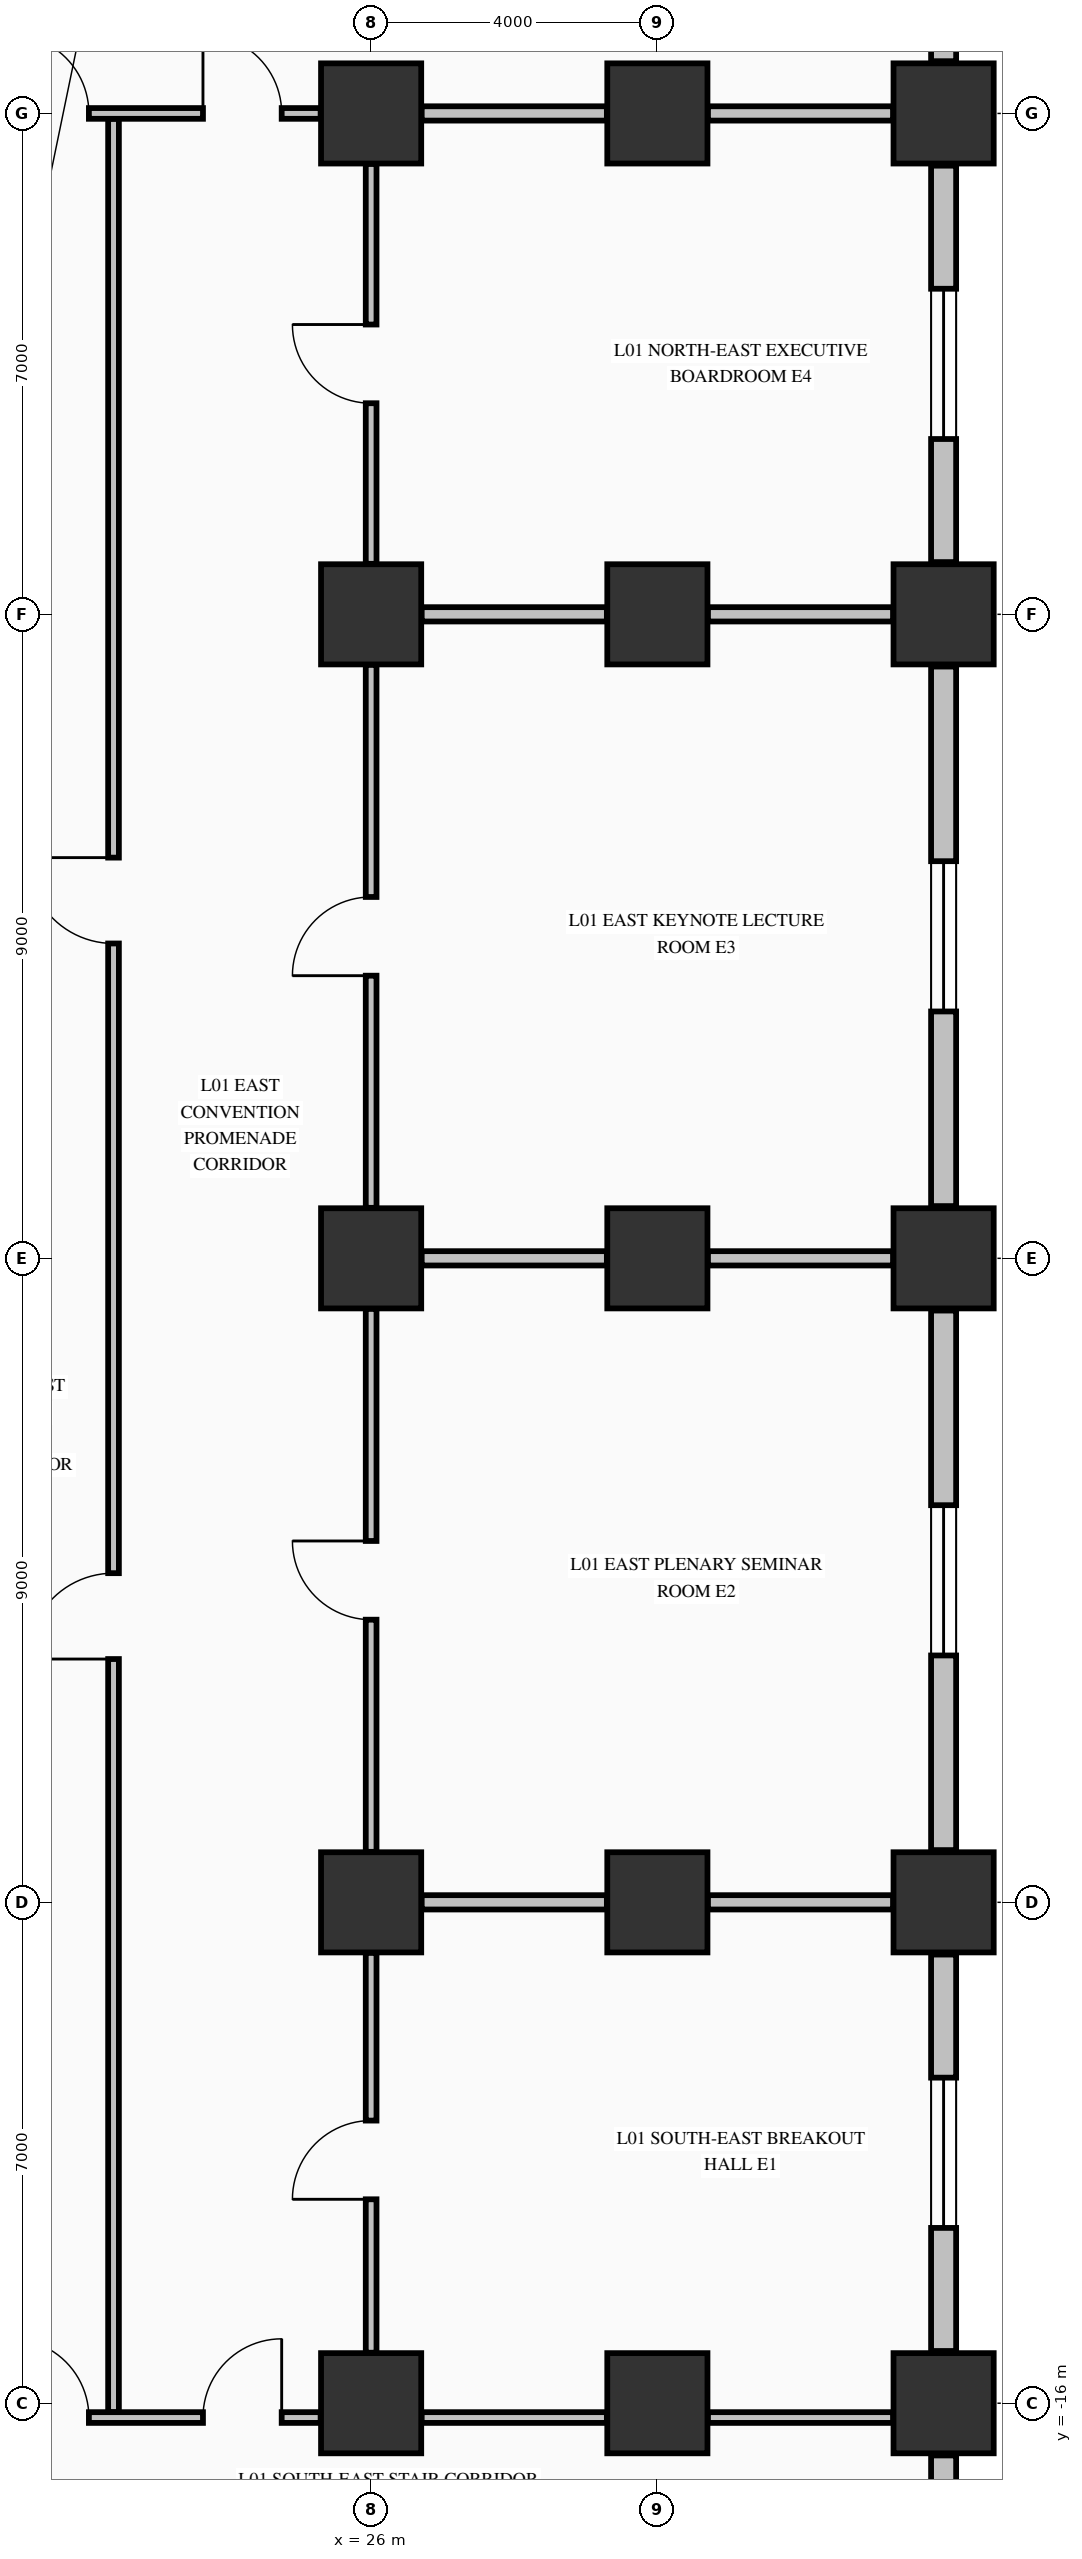
"""IFC4 building model, lengths in metres.
Left out: names, types, materials, properties, quantities, classifications, styles, units other than length and angle.
Written with IfcOpenShell. Run it as: python <this file> out.ifc"""

import sys

from ifc_helpers import new_model, si_unit, direction, frame, frame_2d, origin, origin_2d, place, context, subcontext, project, spatial, rectangle, extrude, element, fill, save


model = new_model("IFC4")
c1 = context("Model", 3, precision=1e-05, world=origin(), true_north=direction((0.0, 1.0)))
c2 = subcontext(c1, "Body", "Model", "MODEL_VIEW")
j1 = project(units=[si_unit("LENGTHUNIT", "METRE"), si_unit("PLANEANGLEUNIT", "RADIAN")], contexts=[c1])
p1 = place(None, origin())
s1 = spatial("IfcSite", under=j1, at=p1, CompositionType="ELEMENT")
p2 = place(p1, origin())
s2 = spatial("IfcBuilding", under=s1, at=p2, CompositionType="ELEMENT")
p3 = place(p2, frame((0.0, 0.0, 5.44)))
s3 = spatial("IfcBuildingStorey", under=s2, at=p3, CompositionType="ELEMENT", Elevation=5.44)
for number, where, z_axis, x_axis in (
    (1, (26.0, -16.0, 0.0), (0.0, 0.0, 1.0), (1.0, 0.0, 0.0)),
    (2, (26.0, -9.0, 0.0), (0.0, 0.0, 1.0), (1.0, 0.0, 0.0)),
    (3, (26.0, 0.0, 0.0), (0.0, 0.0, 1.0), (1.0, 0.0, 0.0)),
    (4, (26.0, 9.0, 0.0), (0.0, 0.0, 1.0), (1.0, 0.0, 0.0)),
    (5, (26.0, 16.0, 0.0), (0.0, 0.0, 1.0), (1.0, 0.0, 0.0)),
    (6, (30.0, -16.0, 0.0), (0.0, 0.0, 1.0), (1.0, 0.0, 0.0)),
    (7, (30.0, -9.0, 0.0), (0.0, 0.0, 1.0), (1.0, 0.0, 0.0)),
    (8, (30.0, 0.0, 0.0), (0.0, 0.0, 1.0), (1.0, 0.0, 0.0)),
    (9, (30.0, 9.0, 0.0), (0.0, 0.0, 1.0), (1.0, 0.0, 0.0)),
    (10, (30.0, 16.0, 0.0), (0.0, 0.0, 1.0), (1.0, 0.0, 0.0)),
    (11, (34.0, -16.0, 0.0), (0.0, 0.0, 1.0), (1.0, 0.0, 0.0)),
    (12, (34.0, -9.0, 0.0), (0.0, 0.0, 1.0), (1.0, 0.0, 0.0)),
    (13, (34.0, 0.0, 0.0), (0.0, 0.0, 1.0), (1.0, 0.0, 0.0)),
    (14, (34.0, 9.0, 0.0), (0.0, 0.0, 1.0), (1.0, 0.0, 0.0)),
    (15, (34.0, 16.0, 0.0), (0.0, 0.0, 1.0), (1.0, 0.0, 0.0)),
):
    element("IfcColumn", number, at=place(p3, frame(where, z_axis=z_axis, x_axis=x_axis)), inside=s3, PredefinedType="COLUMN", context=c2, shape_type="SweptSolid", body=[
        extrude(rectangle(XDim=1.4, YDim=1.4, at=origin_2d()), origin(), (0.0, 0.0, 1.0), 5.09),
    ])
p4 = place(p3, frame((34.0, -16.73, 0.0), z_axis=(0.0, 0.0, 1.0), x_axis=(0.0, -1.0, 0.0)))
e16 = element("IfcWall", 16, at=p4, inside=s3, PredefinedType="STANDARD", context=c2, shape_type="SweptSolid", body=[
    extrude(rectangle(XDim=4.54, YDim=0.35, at=frame_2d((2.27, 0.0))), origin(), (0.0, 0.0, 1.0), 5.09),
])
p5 = place(p3, frame((34.0, -9.73, 0.0), z_axis=(0.0, 0.0, 1.0), x_axis=(0.0, -1.0, 0.0)))
e17 = element("IfcWall", 17, at=p5, inside=s3, PredefinedType="STANDARD", context=c2, shape_type="SweptSolid", body=[
    extrude(rectangle(XDim=5.54, YDim=0.35, at=frame_2d((2.77, 0.0))), origin(), (0.0, 0.0, 1.0), 4.482),
])
p6 = place(p5, frame((1.72, 0.0, 0.75)))
e18 = element("IfcOpeningElement", 18, at=p6, cuts=e17, PredefinedType="OPENING", context=c2, shape_type="SweptSolid", body=[
    extrude(rectangle(XDim=2.1, YDim=1.75, at=frame_2d((1.05, 0.875))), frame((0.0, 0.185, 0.0), z_axis=(0.0, -1.0, 0.0), x_axis=(1.0, 0.0, 0.0)), (0.0, 0.0, 1.0), 0.37),
])
p7 = place(p3, frame((34.0, -0.73, 0.0), z_axis=(0.0, 0.0, 1.0), x_axis=(0.0, -1.0, 0.0)))
e19 = element("IfcWall", 19, at=p7, inside=s3, PredefinedType="STANDARD", context=c2, shape_type="SweptSolid", body=[
    extrude(rectangle(XDim=7.54, YDim=0.35, at=frame_2d((3.77, 0.0))), origin(), (0.0, 0.0, 1.0), 4.482),
])
p8 = place(p7, frame((2.72, 0.0, 0.75)))
e20 = element("IfcOpeningElement", 20, at=p8, cuts=e19, PredefinedType="OPENING", context=c2, shape_type="SweptSolid", body=[
    extrude(rectangle(XDim=2.1, YDim=1.75, at=frame_2d((1.05, 0.875))), frame((0.0, 0.185, 0.0), z_axis=(0.0, -1.0, 0.0), x_axis=(1.0, 0.0, 0.0)), (0.0, 0.0, 1.0), 0.37),
])
p9 = place(p3, frame((34.0, 8.27, 0.0), z_axis=(0.0, 0.0, 1.0), x_axis=(0.0, -1.0, 0.0)))
e21 = element("IfcWall", 21, at=p9, inside=s3, PredefinedType="STANDARD", context=c2, shape_type="SweptSolid", body=[
    extrude(rectangle(XDim=7.54, YDim=0.35, at=frame_2d((3.77, 0.0))), origin(), (0.0, 0.0, 1.0), 4.482),
])
p10 = place(p9, frame((2.72, 0.0, 0.75)))
e22 = element("IfcOpeningElement", 22, at=p10, cuts=e21, PredefinedType="OPENING", context=c2, shape_type="SweptSolid", body=[
    extrude(rectangle(XDim=2.1, YDim=1.75, at=frame_2d((1.05, 0.875))), frame((0.0, 0.185, 0.0), z_axis=(0.0, -1.0, 0.0), x_axis=(1.0, 0.0, 0.0)), (0.0, 0.0, 1.0), 0.37),
])
p11 = place(p3, frame((34.0, 15.27, 0.0), z_axis=(0.0, 0.0, 1.0), x_axis=(0.0, -1.0, 0.0)))
e23 = element("IfcWall", 23, at=p11, inside=s3, PredefinedType="STANDARD", context=c2, shape_type="SweptSolid", body=[
    extrude(rectangle(XDim=5.54, YDim=0.35, at=frame_2d((2.77, 0.0))), origin(), (0.0, 0.0, 1.0), 4.482),
])
p12 = place(p11, frame((1.72, 0.0, 0.75)))
e24 = element("IfcOpeningElement", 24, at=p12, cuts=e23, PredefinedType="OPENING", context=c2, shape_type="SweptSolid", body=[
    extrude(rectangle(XDim=2.1, YDim=1.75, at=frame_2d((1.05, 0.875))), frame((0.0, 0.185, 0.0), z_axis=(0.0, -1.0, 0.0), x_axis=(1.0, 0.0, 0.0)), (0.0, 0.0, 1.0), 0.37),
])
p13 = place(p3, frame((34.0, 21.27, 0.0), z_axis=(0.0, 0.0, 1.0), x_axis=(0.0, -1.0, 0.0)))
e25 = element("IfcWall", 25, at=p13, inside=s3, PredefinedType="STANDARD", context=c2, shape_type="SweptSolid", body=[
    extrude(rectangle(XDim=4.54, YDim=0.35, at=frame_2d((2.27, 0.0))), origin(), (0.0, 0.0, 1.0), 5.09),
])
p14 = place(p3, frame((20.806, -16.2, 0.0), z_axis=(0.0, 0.0, 1.0), x_axis=(1.0, 0.0, 0.0)))
e26 = element("IfcWall", 26, at=p14, inside=s3, PredefinedType="PARTITIONING", context=c2, shape_type="SweptSolid", body=[
    extrude(rectangle(XDim=4.488, YDim=0.15, at=frame_2d((2.244, 0.0))), origin(), (0.0, 0.0, 1.0), 4.132),
])
p15 = place(p14, frame((0.15, 0.0, 0.0)))
e27 = element("IfcOpeningElement", 27, at=p15, cuts=e26, PredefinedType="OPENING", context=c2, shape_type="SweptSolid", body=[
    extrude(rectangle(XDim=1.1, YDim=2.15, at=frame_2d((0.55, 1.075))), frame((0.0, 0.085, 0.0), z_axis=(0.0, -1.0, 0.0), x_axis=(1.0, 0.0, 0.0)), (0.0, 0.0, 1.0), 0.17),
])
p16 = place(p14, frame((2.844, 0.0, 0.0)))
e28 = element("IfcOpeningElement", 28, at=p16, cuts=e26, PredefinedType="OPENING", context=c2, shape_type="SweptSolid", body=[
    extrude(rectangle(XDim=1.1, YDim=2.15, at=frame_2d((0.55, 1.075))), frame((0.0, 0.085, 0.0), z_axis=(0.0, -1.0, 0.0), x_axis=(1.0, 0.0, 0.0)), (0.0, 0.0, 1.0), 0.17),
])
for number, where, z_axis, x_axis in (
    (29, (26.706, -16.2, 0.0), (0.0, 0.0, 1.0), (1.0, 0.0, 0.0)),
    (30, (30.706, -16.2, 0.0), (0.0, 0.0, 1.0), (1.0, 0.0, 0.0)),
):
    element("IfcWall", number, at=place(p3, frame(where, z_axis=z_axis, x_axis=x_axis)), inside=s3, PredefinedType="PARTITIONING", context=c2, shape_type="SweptSolid", body=[
        extrude(rectangle(XDim=2.588, YDim=0.15, at=frame_2d((1.294, 0.0))), origin(), (0.0, 0.0, 1.0), 4.132),
    ])
for number, where, z_axis, x_axis in (
    (31, (26.706, -9.0, 0.0), (0.0, 0.0, 1.0), (1.0, 0.0, 0.0)),
    (32, (30.706, -9.0, 0.0), (0.0, 0.0, 1.0), (1.0, 0.0, 0.0)),
    (33, (26.706, 0.0, 0.0), (0.0, 0.0, 1.0), (1.0, 0.0, 0.0)),
    (34, (30.706, 0.0, 0.0), (0.0, 0.0, 1.0), (1.0, 0.0, 0.0)),
    (35, (26.706, 9.0, 0.0), (0.0, 0.0, 1.0), (1.0, 0.0, 0.0)),
    (36, (30.706, 9.0, 0.0), (0.0, 0.0, 1.0), (1.0, 0.0, 0.0)),
):
    element("IfcWall", number, at=place(p3, frame(where, z_axis=z_axis, x_axis=x_axis)), inside=s3, PredefinedType="PARTITIONING", context=c2, shape_type="SweptSolid", body=[
        extrude(rectangle(XDim=2.588, YDim=0.2, at=frame_2d((1.294, 0.0))), origin(), (0.0, 0.0, 1.0), 4.132),
    ])
p17 = place(p3, frame((20.806, 16.0, 0.0), z_axis=(0.0, 0.0, 1.0), x_axis=(1.0, 0.0, 0.0)))
e37 = element("IfcWall", 37, at=p17, inside=s3, PredefinedType="PARTITIONING", context=c2, shape_type="SweptSolid", body=[
    extrude(rectangle(XDim=4.488, YDim=0.15, at=frame_2d((2.244, 0.0))), origin(), (0.0, 0.0, 1.0), 4.132),
])
p18 = place(p17, frame((0.15, 0.0, 0.0)))
e38 = element("IfcOpeningElement", 38, at=p18, cuts=e37, PredefinedType="OPENING", context=c2, shape_type="SweptSolid", body=[
    extrude(rectangle(XDim=1.1, YDim=2.15, at=frame_2d((0.55, 1.075))), frame((0.0, 0.085, 0.0), z_axis=(0.0, -1.0, 0.0), x_axis=(1.0, 0.0, 0.0)), (0.0, 0.0, 1.0), 0.17),
])
p19 = place(p17, frame((2.844, 0.0, 0.0)))
e39 = element("IfcOpeningElement", 39, at=p19, cuts=e37, PredefinedType="OPENING", context=c2, shape_type="SweptSolid", body=[
    extrude(rectangle(XDim=1.1, YDim=2.15, at=frame_2d((0.55, 1.075))), frame((0.0, 0.085, 0.0), z_axis=(0.0, -1.0, 0.0), x_axis=(1.0, 0.0, 0.0)), (0.0, 0.0, 1.0), 0.17),
])
for number, where, z_axis, x_axis in (
    (40, (26.706, 16.0, 0.0), (0.0, 0.0, 1.0), (1.0, 0.0, 0.0)),
    (41, (30.706, 16.0, 0.0), (0.0, 0.0, 1.0), (1.0, 0.0, 0.0)),
):
    element("IfcWall", number, at=place(p3, frame(where, z_axis=z_axis, x_axis=x_axis)), inside=s3, PredefinedType="PARTITIONING", context=c2, shape_type="SweptSolid", body=[
        extrude(rectangle(XDim=2.588, YDim=0.2, at=frame_2d((1.294, 0.0))), origin(), (0.0, 0.0, 1.0), 4.132),
    ])
p20 = place(p3, frame((22.4, -16.122, 0.0), z_axis=(0.0, 0.0, 1.0), x_axis=(0.0, 1.0, 0.0)))
e42 = element("IfcWall", 42, at=p20, inside=s3, PredefinedType="PARTITIONING", context=c2, shape_type="SweptSolid", body=[
    extrude(rectangle(XDim=32.044, YDim=0.15, at=frame_2d((16.022, 0.0))), origin(), (0.0, 0.0, 1.0), 5.09),
])
p21 = place(p20, frame((10.522, 0.0, 0.0)))
e43 = element("IfcOpeningElement", 43, at=p21, cuts=e42, PredefinedType="OPENING", context=c2, shape_type="SweptSolid", body=[
    extrude(rectangle(XDim=1.2, YDim=2.15, at=frame_2d((0.6, 1.075))), frame((0.0, 0.085, 0.0), z_axis=(0.0, -1.0, 0.0), x_axis=(1.0, 0.0, 0.0)), (0.0, 0.0, 1.0), 0.17),
])
p22 = place(p20, frame((20.522, 0.0, 0.0)))
e44 = element("IfcOpeningElement", 44, at=p22, cuts=e42, PredefinedType="OPENING", context=c2, shape_type="SweptSolid", body=[
    extrude(rectangle(XDim=1.2, YDim=2.15, at=frame_2d((0.6, 1.075))), frame((0.0, 0.085, 0.0), z_axis=(0.0, -1.0, 0.0), x_axis=(1.0, 0.0, 0.0)), (0.0, 0.0, 1.0), 0.17),
])
p23 = place(p3, frame((26.0, -15.294, 0.0), z_axis=(0.0, 0.0, 1.0), x_axis=(0.0, 1.0, 0.0)))
e45 = element("IfcWall", 45, at=p23, inside=s3, PredefinedType="PARTITIONING", context=c2, shape_type="SweptSolid", body=[
    extrude(rectangle(XDim=5.588, YDim=0.15, at=frame_2d((2.794, 0.0))), origin(), (0.0, 0.0, 1.0), 4.132),
])
p24 = place(p23, frame((2.144, 0.0, 0.0)))
e46 = element("IfcOpeningElement", 46, at=p24, cuts=e45, PredefinedType="OPENING", context=c2, shape_type="SweptSolid", body=[
    extrude(rectangle(XDim=1.1, YDim=2.15, at=frame_2d((0.55, 1.075))), frame((0.0, 0.085, 0.0), z_axis=(0.0, -1.0, 0.0), x_axis=(1.0, 0.0, 0.0)), (0.0, 0.0, 1.0), 0.17),
])
p25 = place(p3, frame((26.0, -8.294, 0.0), z_axis=(0.0, 0.0, 1.0), x_axis=(0.0, 1.0, 0.0)))
e47 = element("IfcWall", 47, at=p25, inside=s3, PredefinedType="PARTITIONING", context=c2, shape_type="SweptSolid", body=[
    extrude(rectangle(XDim=7.588, YDim=0.15, at=frame_2d((3.794, 0.0))), origin(), (0.0, 0.0, 1.0), 4.132),
])
p26 = place(p25, frame((3.244, 0.0, 0.0)))
e48 = element("IfcOpeningElement", 48, at=p26, cuts=e47, PredefinedType="OPENING", context=c2, shape_type="SweptSolid", body=[
    extrude(rectangle(XDim=1.1, YDim=2.15, at=frame_2d((0.55, 1.075))), frame((0.0, 0.085, 0.0), z_axis=(0.0, -1.0, 0.0), x_axis=(1.0, 0.0, 0.0)), (0.0, 0.0, 1.0), 0.17),
])
p27 = place(p3, frame((26.0, 0.706, 0.0), z_axis=(0.0, 0.0, 1.0), x_axis=(0.0, 1.0, 0.0)))
e49 = element("IfcWall", 49, at=p27, inside=s3, PredefinedType="PARTITIONING", context=c2, shape_type="SweptSolid", body=[
    extrude(rectangle(XDim=7.588, YDim=0.15, at=frame_2d((3.794, 0.0))), origin(), (0.0, 0.0, 1.0), 4.132),
])
p28 = place(p27, frame((3.244, 0.0, 0.0)))
e50 = element("IfcOpeningElement", 50, at=p28, cuts=e49, PredefinedType="OPENING", context=c2, shape_type="SweptSolid", body=[
    extrude(rectangle(XDim=1.1, YDim=2.15, at=frame_2d((0.55, 1.075))), frame((0.0, 0.085, 0.0), z_axis=(0.0, -1.0, 0.0), x_axis=(1.0, 0.0, 0.0)), (0.0, 0.0, 1.0), 0.17),
])
p29 = place(p3, frame((26.0, 9.706, 0.0), z_axis=(0.0, 0.0, 1.0), x_axis=(0.0, 1.0, 0.0)))
e51 = element("IfcWall", 51, at=p29, inside=s3, PredefinedType="PARTITIONING", context=c2, shape_type="SweptSolid", body=[
    extrude(rectangle(XDim=5.588, YDim=0.15, at=frame_2d((2.794, 0.0))), origin(), (0.0, 0.0, 1.0), 4.132),
])
p30 = place(p29, frame((2.244, 0.0, 0.0)))
e52 = element("IfcOpeningElement", 52, at=p30, cuts=e51, PredefinedType="OPENING", context=c2, shape_type="SweptSolid", body=[
    extrude(rectangle(XDim=1.1, YDim=2.15, at=frame_2d((0.55, 1.075))), frame((0.0, 0.085, 0.0), z_axis=(0.0, -1.0, 0.0), x_axis=(1.0, 0.0, 0.0)), (0.0, 0.0, 1.0), 0.17),
])
p31 = place(p6, origin())
e53 = element("IfcWindow", 53, at=p31, inside=s3, PartitioningType="SINGLE_PANEL", PredefinedType="WINDOW", context=c2, shape_type="SweptSolid", body=[
    extrude(rectangle(XDim=2.1, YDim=1.75, at=frame_2d((1.05, 0.875))), frame((0.0, 0.03, 0.0), z_axis=(0.0, -1.0, 0.0), x_axis=(1.0, 0.0, 0.0)), (0.0, 0.0, 1.0), 0.06),
])
fill(e18, e53)
p32 = place(p8, origin())
e54 = element("IfcWindow", 54, at=p32, inside=s3, PartitioningType="SINGLE_PANEL", PredefinedType="WINDOW", context=c2, shape_type="SweptSolid", body=[
    extrude(rectangle(XDim=2.1, YDim=1.75, at=frame_2d((1.05, 0.875))), frame((0.0, 0.03, 0.0), z_axis=(0.0, -1.0, 0.0), x_axis=(1.0, 0.0, 0.0)), (0.0, 0.0, 1.0), 0.06),
])
fill(e20, e54)
p33 = place(p10, origin())
e55 = element("IfcWindow", 55, at=p33, inside=s3, PartitioningType="SINGLE_PANEL", PredefinedType="WINDOW", context=c2, shape_type="SweptSolid", body=[
    extrude(rectangle(XDim=2.1, YDim=1.75, at=frame_2d((1.05, 0.875))), frame((0.0, 0.03, 0.0), z_axis=(0.0, -1.0, 0.0), x_axis=(1.0, 0.0, 0.0)), (0.0, 0.0, 1.0), 0.06),
])
fill(e22, e55)
p34 = place(p12, origin())
e56 = element("IfcWindow", 56, at=p34, inside=s3, PartitioningType="SINGLE_PANEL", PredefinedType="WINDOW", context=c2, shape_type="SweptSolid", body=[
    extrude(rectangle(XDim=2.1, YDim=1.75, at=frame_2d((1.05, 0.875))), frame((0.0, 0.03, 0.0), z_axis=(0.0, -1.0, 0.0), x_axis=(1.0, 0.0, 0.0)), (0.0, 0.0, 1.0), 0.06),
])
fill(e24, e56)
p35 = place(p18, origin())
e57 = element("IfcDoor", 57, at=p35, inside=s3, OperationType="SINGLE_SWING_LEFT", PredefinedType="DOOR", context=c2, shape_type="SweptSolid", body=[
    extrude(rectangle(XDim=1.1, YDim=2.15, at=frame_2d((0.55, 1.075))), frame((0.0, 0.025, 0.0), z_axis=(0.0, -1.0, 0.0), x_axis=(1.0, 0.0, 0.0)), (0.0, 0.0, 1.0), 0.05),
])
fill(e38, e57)
p36 = place(p15, origin())
e58 = element("IfcDoor", 58, at=p36, inside=s3, OperationType="SINGLE_SWING_LEFT", PredefinedType="DOOR", context=c2, shape_type="SweptSolid", body=[
    extrude(rectangle(XDim=1.1, YDim=2.15, at=frame_2d((0.55, 1.075))), frame((0.0, 0.025, 0.0), z_axis=(0.0, -1.0, 0.0), x_axis=(1.0, 0.0, 0.0)), (0.0, 0.0, 1.0), 0.05),
])
fill(e27, e58)
p37 = place(p21, origin())
e59 = element("IfcDoor", 59, at=p37, inside=s3, OperationType="SINGLE_SWING_LEFT", PredefinedType="DOOR", context=c2, shape_type="SweptSolid", body=[
    extrude(rectangle(XDim=1.2, YDim=2.15, at=frame_2d((0.6, 1.075))), frame((0.0, 0.025, 0.0), z_axis=(0.0, -1.0, 0.0), x_axis=(1.0, 0.0, 0.0)), (0.0, 0.0, 1.0), 0.05),
])
fill(e43, e59)
p38 = place(p22, origin())
e60 = element("IfcDoor", 60, at=p38, inside=s3, OperationType="SINGLE_SWING_RIGHT", PredefinedType="DOOR", context=c2, shape_type="SweptSolid", body=[
    extrude(rectangle(XDim=1.2, YDim=2.15, at=frame_2d((0.6, 1.075))), frame((0.0, 0.025, 0.0), z_axis=(0.0, -1.0, 0.0), x_axis=(1.0, 0.0, 0.0)), (0.0, 0.0, 1.0), 0.05),
])
fill(e44, e60)
p39 = place(p19, origin())
e61 = element("IfcDoor", 61, at=p39, inside=s3, OperationType="SINGLE_SWING_LEFT", PredefinedType="DOOR", context=c2, shape_type="SweptSolid", body=[
    extrude(rectangle(XDim=1.1, YDim=2.15, at=frame_2d((0.55, 1.075))), frame((0.0, 0.025, 0.0), z_axis=(0.0, -1.0, 0.0), x_axis=(1.0, 0.0, 0.0)), (0.0, 0.0, 1.0), 0.05),
])
fill(e39, e61)
p40 = place(p16, origin())
e62 = element("IfcDoor", 62, at=p40, inside=s3, OperationType="SINGLE_SWING_RIGHT", PredefinedType="DOOR", context=c2, shape_type="SweptSolid", body=[
    extrude(rectangle(XDim=1.1, YDim=2.15, at=frame_2d((0.55, 1.075))), frame((0.0, 0.025, 0.0), z_axis=(0.0, -1.0, 0.0), x_axis=(1.0, 0.0, 0.0)), (0.0, 0.0, 1.0), 0.05),
])
fill(e28, e62)
p41 = place(p24, origin())
e63 = element("IfcDoor", 63, at=p41, inside=s3, OperationType="SINGLE_SWING_LEFT", PredefinedType="DOOR", context=c2, shape_type="SweptSolid", body=[
    extrude(rectangle(XDim=1.1, YDim=2.15, at=frame_2d((0.55, 1.075))), frame((0.0, 0.025, 0.0), z_axis=(0.0, -1.0, 0.0), x_axis=(1.0, 0.0, 0.0)), (0.0, 0.0, 1.0), 0.05),
])
fill(e46, e63)
p42 = place(p26, origin())
e64 = element("IfcDoor", 64, at=p42, inside=s3, OperationType="SINGLE_SWING_RIGHT", PredefinedType="DOOR", context=c2, shape_type="SweptSolid", body=[
    extrude(rectangle(XDim=1.1, YDim=2.15, at=frame_2d((0.55, 1.075))), frame((0.0, 0.025, 0.0), z_axis=(0.0, -1.0, 0.0), x_axis=(1.0, 0.0, 0.0)), (0.0, 0.0, 1.0), 0.05),
])
fill(e48, e64)
p43 = place(p28, origin())
e65 = element("IfcDoor", 65, at=p43, inside=s3, OperationType="SINGLE_SWING_LEFT", PredefinedType="DOOR", context=c2, shape_type="SweptSolid", body=[
    extrude(rectangle(XDim=1.1, YDim=2.15, at=frame_2d((0.55, 1.075))), frame((0.0, 0.025, 0.0), z_axis=(0.0, -1.0, 0.0), x_axis=(1.0, 0.0, 0.0)), (0.0, 0.0, 1.0), 0.05),
])
fill(e50, e65)
p44 = place(p30, origin())
e66 = element("IfcDoor", 66, at=p44, inside=s3, OperationType="SINGLE_SWING_RIGHT", PredefinedType="DOOR", context=c2, shape_type="SweptSolid", body=[
    extrude(rectangle(XDim=1.1, YDim=2.15, at=frame_2d((0.55, 1.075))), frame((0.0, 0.025, 0.0), z_axis=(0.0, -1.0, 0.0), x_axis=(1.0, 0.0, 0.0)), (0.0, 0.0, 1.0), 0.05),
])
fill(e52, e66)
save(model, sys.argv[1])
